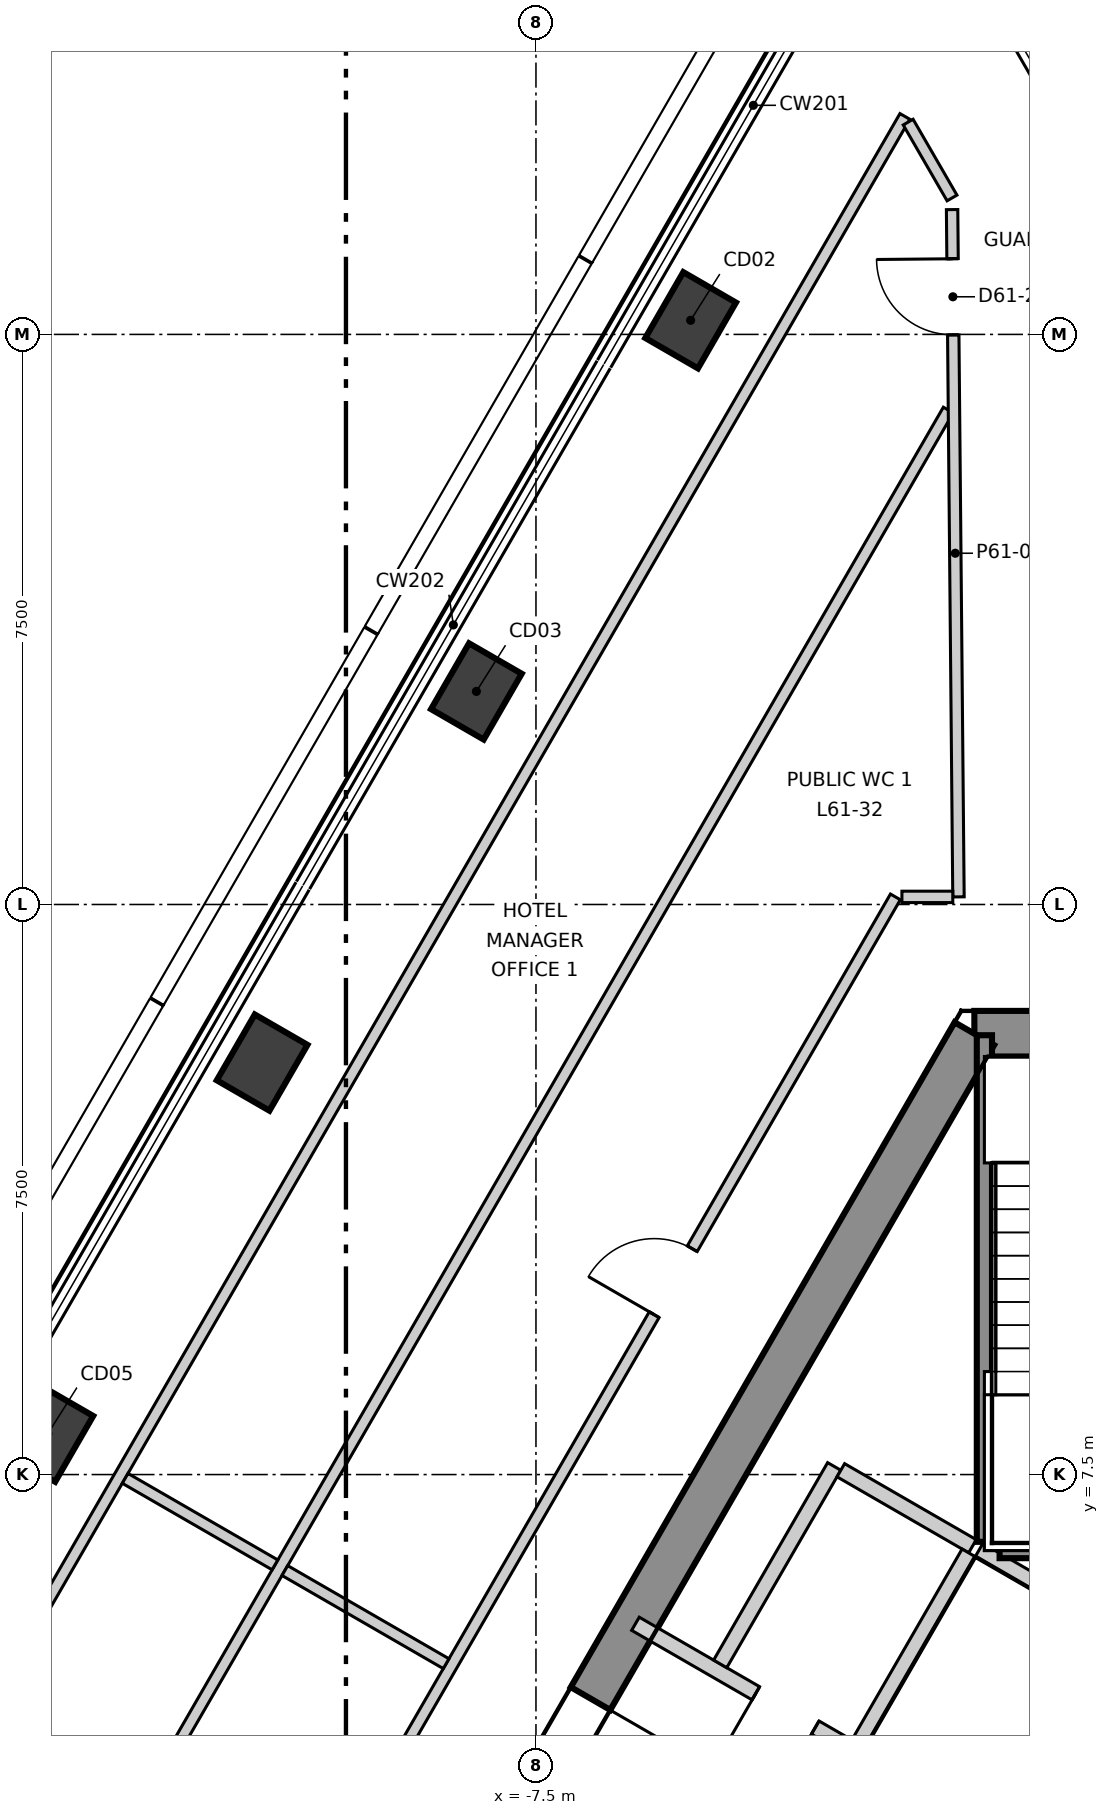
"""IFC4 building model, lengths in metres.
Left out: names, types, materials, properties, quantities, classifications, styles, units other than length and angle.
Written with IfcOpenShell. Run it as: python <this file> out.ifc"""

import sys

from ifc_helpers import new_model, si_unit, direction, frame, frame_2d, origin, origin_2d, place, context, subcontext, project, spatial, polyline, rectangle, outline, extrude, element, fill, save


model = new_model("IFC4")
c1 = context("Model", 3, precision=1e-05, world=origin(), true_north=direction((0.0, 1.0)))
c2 = subcontext(c1, "Body", "Model", "MODEL_VIEW")
j1 = project(units=[si_unit("LENGTHUNIT", "METRE"), si_unit("PLANEANGLEUNIT", "RADIAN")], contexts=[c1])
p1 = place(None, origin())
s1 = spatial("IfcSite", under=j1, at=p1, CompositionType="ELEMENT")
p2 = place(p1, origin())
s2 = spatial("IfcBuilding", under=s1, at=p2, CompositionType="ELEMENT")
p3 = place(p2, frame((0.0, 0.0, 261.8)))
s3 = spatial("IfcBuildingStorey", under=s2, at=p3, CompositionType="ELEMENT", Elevation=261.8)
p4 = place(p3, frame((1.732, 13.3, -0.3), z_axis=(0.0, 0.0, 1.0), x_axis=(-1.0, 0.0, 0.0)))
e1 = element("IfcWall", 1, at=p4, inside=s3, PredefinedType="SHEAR", context=c2, shape_type="SweptSolid", body=[
    extrude(outline(polyline([(-0.173, -0.3), (1.732, -0.3), (3.637, -0.3), (3.291, 0.3), (1.732, 0.3), (0.173, 0.3), (-0.173, -0.3)])), origin(), (0.0, 0.0, 1.0), 6.5),
])
p5 = place(p4, frame((1.032, 0.0, 0.3)))
e2 = element("IfcOpeningElement", 2, at=p5, cuts=e1, PredefinedType="OPENING", context=c2, shape_type="SweptSolid", body=[
    extrude(rectangle(XDim=1.4, YDim=2.1, at=frame_2d((0.7, 1.05))), frame((0.0, 0.31, 0.0), z_axis=(0.0, -1.0, 0.0), x_axis=(1.0, 0.0, 0.0)), (0.0, 0.0, 1.0), 0.62),
])
p6 = place(p3, frame((-1.732, 13.3, -0.3), z_axis=(0.0, 0.0, 1.0), x_axis=(-0.500000539815, -0.866025092122, 0.0)))
e3 = element("IfcWall", 3, at=p6, inside=s3, PredefinedType="SHEAR", context=c2, shape_type="SweptSolid", body=[
    extrude(outline(polyline([(-0.173, -0.3), (1.795, -0.3), (3.763, -0.3), (5.732, -0.3), (7.7, -0.3), (9.668, -0.301), (11.637, -0.301), (13.605, -0.301), (15.573, -0.301), (17.542, -0.301), (19.51, -0.301), (21.478, -0.301), (21.131, 0.3), (19.226, 0.3), (17.321, 0.3), (15.415, 0.3), (13.51, 0.3), (11.605, 0.3), (9.699, 0.3), (7.794, 0.3), (5.889, 0.3), (3.984, 0.3), (2.078, 0.3), (0.173, 0.3), (-0.173, -0.3)])), origin(), (0.0, 0.0, 1.0), 6.5),
])
p7 = place(p6, frame((10.102, 0.0, 0.3)))
e4 = element("IfcOpeningElement", 4, at=p7, cuts=e3, PredefinedType="OPENING", context=c2, shape_type="SweptSolid", body=[
    extrude(rectangle(XDim=1.1, YDim=2.1, at=frame_2d((0.55, 1.05))), frame((0.0, 0.31, 0.0), z_axis=(0.0, -1.0, 0.0), x_axis=(1.0, 0.0, 0.0)), (0.0, 0.0, 1.0), 0.621),
])
p8 = place(p6, frame((16.248, 0.0, 0.3)))
e5 = element("IfcOpeningElement", 5, at=p8, cuts=e3, PredefinedType="OPENING", context=c2, shape_type="SweptSolid", body=[
    extrude(rectangle(XDim=0.9, YDim=2.1, at=frame_2d((0.45, 1.05))), frame((0.0, 0.31, 0.0), z_axis=(0.0, -1.0, 0.0), x_axis=(1.0, 0.0, 0.0)), (0.0, 0.0, 1.0), 0.621),
])
for number, where, z_axis, x_axis in (
    (6, (-5.465, 22.686, -0.3), (0.0, 0.0, 1.0), (0.5, 0.866, 0.0)),
    (7, (-8.284, 17.803, -0.3), (0.0, 0.0, 1.0), (0.5, 0.866, 0.0)),
    (8, (-11.103, 12.92, -0.3), (0.0, 0.0, 1.0), (0.5, 0.866, 0.0)),
    (9, (-13.922, 8.038, -0.3), (0.0, 0.0, 1.0), (0.5, 0.866, 0.0)),
):
    element("IfcColumn", number, at=place(p3, frame(where, z_axis=z_axis, x_axis=x_axis)), inside=s3, PredefinedType="COLUMN", context=c2, shape_type="SweptSolid", body=[
        extrude(rectangle(XDim=1.0, YDim=0.8, at=origin_2d()), origin(), (0.0, 0.0, 1.0), 6.5),
    ])
p9 = place(p3, frame((-14.463, -5.15, 0.0), z_axis=(0.0, 0.0, 1.0), x_axis=(0.500017691629, 0.866015189277, 0.0)))
e10 = element("IfcWall", 10, at=p9, inside=s3, PredefinedType="PARTITIONING", context=c2, shape_type="SweptSolid", body=[
    extrude(rectangle(XDim=23.383, YDim=0.15, at=frame_2d((11.691, 0.0))), origin(), (0.0, 0.0, 1.0), 6.2),
])
p10 = place(p9, frame((17.037, 0.0, 0.0)))
e11 = element("IfcOpeningElement", 11, at=p10, cuts=e10, PredefinedType="OPENING", context=c2, shape_type="SweptSolid", body=[
    extrude(rectangle(XDim=1.0, YDim=2.1, at=frame_2d((0.5, 1.05))), frame((0.0, 0.085, 0.0), z_axis=(0.0, -1.0, 0.0), x_axis=(1.0, 0.0, 0.0)), (0.0, 0.0, 1.0), 0.17),
])
p11 = place(p9, frame((5.346, 0.0, 0.0)))
e12 = element("IfcOpeningElement", 12, at=p11, cuts=e10, PredefinedType="OPENING", context=c2, shape_type="SweptSolid", body=[
    extrude(rectangle(XDim=1.0, YDim=2.1, at=frame_2d((0.5, 1.05))), frame((0.0, 0.085, 0.0), z_axis=(0.0, -1.0, 0.0), x_axis=(1.0, 0.0, 0.0)), (0.0, 0.0, 1.0), 0.17),
])
p12 = place(p3, frame((-19.571, -8.798, 0.0), z_axis=(0.0, 0.0, 1.0), x_axis=(0.500014166641, 0.866017224516, 0.0)))
e13 = element("IfcWall", 13, at=p12, inside=s3, PredefinedType="PARTITIONING", context=c2, shape_type="SweptSolid", body=[
    extrude(rectangle(XDim=34.991, YDim=0.15, at=frame_2d((17.496, 0.0))), origin(), (0.0, 0.0, 1.0), 6.2),
])
p13 = place(p3, frame((-23.25, -10.317, 0.0), z_axis=(0.0, 0.0, 1.0), x_axis=(0.500024875003, 0.866011041719, 0.0)))
e14 = element("IfcWall", 14, at=p13, inside=s3, PredefinedType="PARTITIONING", context=c2, shape_type="SweptSolid", body=[
    extrude(rectangle(XDim=41.206, YDim=0.15, at=frame_2d((20.603, 0.0))), origin(), (0.0, 0.0, 1.0), 6.2),
])
p14 = place(p3, frame((-2.603, 25.293, 0.0), z_axis=(0.0, 0.0, 1.0), x_axis=(0.500602142151, -0.865677477629, 0.0)))
e15 = element("IfcWall", 15, at=p14, inside=s3, PredefinedType="PARTITIONING", context=c2, shape_type="SweptSolid", body=[
    extrude(rectangle(XDim=1.153, YDim=0.15, at=frame_2d((0.576, 0.0))), origin(), (0.0, 0.0, 1.0), 6.2),
])
p15 = place(p3, frame((-2.025, 24.142, 0.0), z_axis=(0.0, 0.0, 1.0), x_axis=(0.00928785944, -0.999956866903, 0.0)))
e16 = element("IfcWall", 16, at=p15, inside=s3, PredefinedType="PARTITIONING", context=c2, shape_type="SweptSolid", body=[
    extrude(rectangle(XDim=9.042, YDim=0.15, at=frame_2d((4.521, 0.0))), origin(), (0.0, 0.0, 1.0), 5.65),
])
p16 = place(p15, frame((0.647, 0.0, 0.0)))
e17 = element("IfcOpeningElement", 17, at=p16, cuts=e16, PredefinedType="OPENING", context=c2, shape_type="SweptSolid", body=[
    extrude(rectangle(XDim=1.0, YDim=2.1, at=frame_2d((0.5, 1.05))), frame((0.0, 0.085, 0.0), z_axis=(0.0, -1.0, 0.0), x_axis=(1.0, 0.0, 0.0)), (0.0, 0.0, 1.0), 0.17),
])
p17 = place(p3, frame((-12.905, 7.45, 0.0), z_axis=(0.0, 0.0, 1.0), x_axis=(0.866023021914, -0.500004125498, 0.0)))
e18 = element("IfcWall", 18, at=p17, inside=s3, PredefinedType="PARTITIONING", context=c2, shape_type="SweptSolid", body=[
    extrude(rectangle(XDim=2.276, YDim=0.15, at=frame_2d((1.138, 0.0))), origin(), (0.0, 0.0, 1.0), 5.7),
])
p18 = place(p3, frame((-10.804, 6.237, 0.0), z_axis=(0.0, 0.0, 1.0), x_axis=(0.8660395779, -0.499975448907, 0.0)))
e19 = element("IfcWall", 19, at=p18, inside=s3, PredefinedType="PARTITIONING", context=c2, shape_type="SweptSolid", body=[
    extrude(rectangle(XDim=2.45, YDim=0.15, at=frame_2d((1.225, 0.0))), origin(), (0.0, 0.0, 1.0), 5.7),
])
p19 = place(p3, frame((-2.685, 15.1, 0.0), z_axis=(0.0, 0.0, 1.0), x_axis=(1.0, 0.0, 0.0)))
e20 = element("IfcWall", 20, at=p19, inside=s3, PredefinedType="PARTITIONING", context=c2, shape_type="SweptSolid", body=[
    extrude(rectangle(XDim=0.669, YDim=0.15, at=frame_2d((0.334, 0.0))), origin(), (0.0, 0.0, 1.0), 6.2),
])
p20 = place(p3, frame((-6.191, 5.537, 0.0), z_axis=(0.0, 0.0, 1.0), x_axis=(0.866052607023, -0.499952879648, 0.0)))
e21 = element("IfcWall", 21, at=p20, inside=s3, PredefinedType="SOLIDWALL", context=c2, shape_type="SweptSolid", body=[
    extrude(rectangle(XDim=3.332, YDim=0.2, at=frame_2d((1.666, 0.0))), origin(), (0.0, 0.0, 1.0), 6.2),
])
p21 = place(p20, frame((1.83, 0.0, 0.0)))
e22 = element("IfcOpeningElement", 22, at=p21, cuts=e21, PredefinedType="OPENING", context=c2, shape_type="SweptSolid", body=[
    extrude(rectangle(XDim=0.9, YDim=2.1, at=frame_2d((0.45, 1.05))), frame((0.0, 0.11, 0.0), z_axis=(0.0, -1.0, 0.0), x_axis=(1.0, 0.0, 0.0)), (0.0, 0.0, 1.0), 0.22),
])
p22 = place(p3, frame((-5.076, 5.009, 0.0), z_axis=(0.0, 0.0, 1.0), x_axis=(0.50002537861, 0.866010750942, 0.0)))
e23 = element("IfcWall", 23, at=p22, inside=s3, PredefinedType="SOLIDWALL", context=c2, shape_type="SweptSolid", body=[
    extrude(rectangle(XDim=3.0, YDim=0.2, at=frame_2d((1.5, 0.0))), origin(), (0.0, 0.0, 1.0), 6.2),
])
p23 = place(p3, frame((-3.489, 7.557, 0.0), z_axis=(0.0, 0.0, 1.0), x_axis=(0.866010750942, -0.50002537861, 0.0)))
e24 = element("IfcWall", 24, at=p23, inside=s3, PredefinedType="SOLIDWALL", context=c2, shape_type="SweptSolid", body=[
    extrude(rectangle(XDim=2.0, YDim=0.2, at=frame_2d((1.0, 0.0))), origin(), (0.0, 0.0, 1.0), 6.2),
])
p24 = place(p3, frame((-3.257, 3.959, 0.0), z_axis=(0.0, 0.0, 1.0), x_axis=(0.50012328804, 0.865954211699, 0.0)))
e25 = element("IfcWall", 25, at=p24, inside=s3, PredefinedType="SOLIDWALL", context=c2, shape_type="SweptSolid", body=[
    extrude(rectangle(XDim=2.9, YDim=0.2, at=frame_2d((1.45, 0.0))), origin(), (0.0, 0.0, 1.0), 6.2),
])
p25 = place(p3, frame((-1.67, 6.507, 0.0), z_axis=(0.0, 0.0, 1.0), x_axis=(0.865941441609, -0.500145398563, 0.0)))
e26 = element("IfcWall", 26, at=p25, inside=s3, PredefinedType="SOLIDWALL", context=c2, shape_type="SweptSolid", body=[
    extrude(rectangle(XDim=1.815, YDim=0.2, at=frame_2d((0.908, 0.0))), origin(), (0.0, 0.0, 1.0), 6.2),
])
p26 = place(p3, frame((-1.438, 2.909, 0.0), z_axis=(0.0, 0.0, 1.0), x_axis=(0.499829630636, 0.866123744241, 0.0)))
e27 = element("IfcWall", 27, at=p26, inside=s3, PredefinedType="SOLIDWALL", context=c2, shape_type="SweptSolid", body=[
    extrude(rectangle(XDim=2.761, YDim=0.2, at=frame_2d((1.38, 0.0))), origin(), (0.0, 0.0, 1.0), 6.2),
])
p27 = place(p3, frame((-1.4, 6.5, 0.0), z_axis=(0.0, 0.0, 1.0), x_axis=(1.0, 0.0, 0.0)))
e28 = element("IfcWall", 28, at=p27, inside=s3, PredefinedType="SOLIDWALL", context=c2, shape_type="SweptSolid", body=[
    extrude(rectangle(XDim=2.8, YDim=0.2, at=frame_2d((1.4, 0.0))), origin(), (0.0, 0.0, 1.0), 6.2),
])
p28 = place(p3, frame((-1.6, 6.615, 0.0), z_axis=(0.0, 0.0, 1.0), x_axis=(0.0, 1.0, 0.0)))
e29 = element("IfcWall", 29, at=p28, inside=s3, PredefinedType="SOLIDWALL", context=c2, shape_type="SweptSolid", body=[
    extrude(rectangle(XDim=6.665, YDim=0.2, at=frame_2d((3.333, 0.0))), origin(), (0.0, 0.0, 1.0), 6.2),
])
p29 = place(p21, origin())
e30 = element("IfcDoor", 30, at=p29, inside=s3, OperationType="SINGLE_SWING_LEFT", PredefinedType="DOOR", context=c2, shape_type="SweptSolid", body=[
    extrude(rectangle(XDim=0.9, YDim=2.1, at=frame_2d((0.45, 1.05))), frame((0.0, 0.025, 0.0), z_axis=(0.0, -1.0, 0.0), x_axis=(1.0, 0.0, 0.0)), (0.0, 0.0, 1.0), 0.05),
])
fill(e22, e30)
p30 = place(p10, origin())
e31 = element("IfcDoor", 31, at=p30, inside=s3, OperationType="SINGLE_SWING_RIGHT", PredefinedType="DOOR", context=c2, shape_type="SweptSolid", body=[
    extrude(rectangle(XDim=1.0, YDim=2.1, at=frame_2d((0.5, 1.05))), frame((0.0, 0.025, 0.0), z_axis=(0.0, -1.0, 0.0), x_axis=(1.0, 0.0, 0.0)), (0.0, 0.0, 1.0), 0.05),
])
fill(e11, e31)
p31 = place(p16, origin())
e32 = element("IfcDoor", 32, at=p31, inside=s3, OperationType="SINGLE_SWING_LEFT", PredefinedType="DOOR", context=c2, shape_type="SweptSolid", body=[
    extrude(rectangle(XDim=1.0, YDim=2.1, at=frame_2d((0.5, 1.05))), frame((0.0, 0.025, 0.0), z_axis=(0.0, -1.0, 0.0), x_axis=(1.0, 0.0, 0.0)), (0.0, 0.0, 1.0), 0.05),
])
fill(e17, e32)
p32 = place(p7, origin())
e33 = element("IfcDoor", 33, at=p32, inside=s3, OperationType="SINGLE_SWING_RIGHT", PredefinedType="DOOR", context=c2, shape_type="SweptSolid", body=[
    extrude(rectangle(XDim=1.1, YDim=2.1, at=frame_2d((0.55, 1.05))), frame((0.0, 0.025, 0.0), z_axis=(0.0, -1.0, 0.0), x_axis=(1.0, 0.0, 0.0)), (0.0, 0.0, 1.0), 0.05),
])
fill(e4, e33)
save(model, sys.argv[1])
